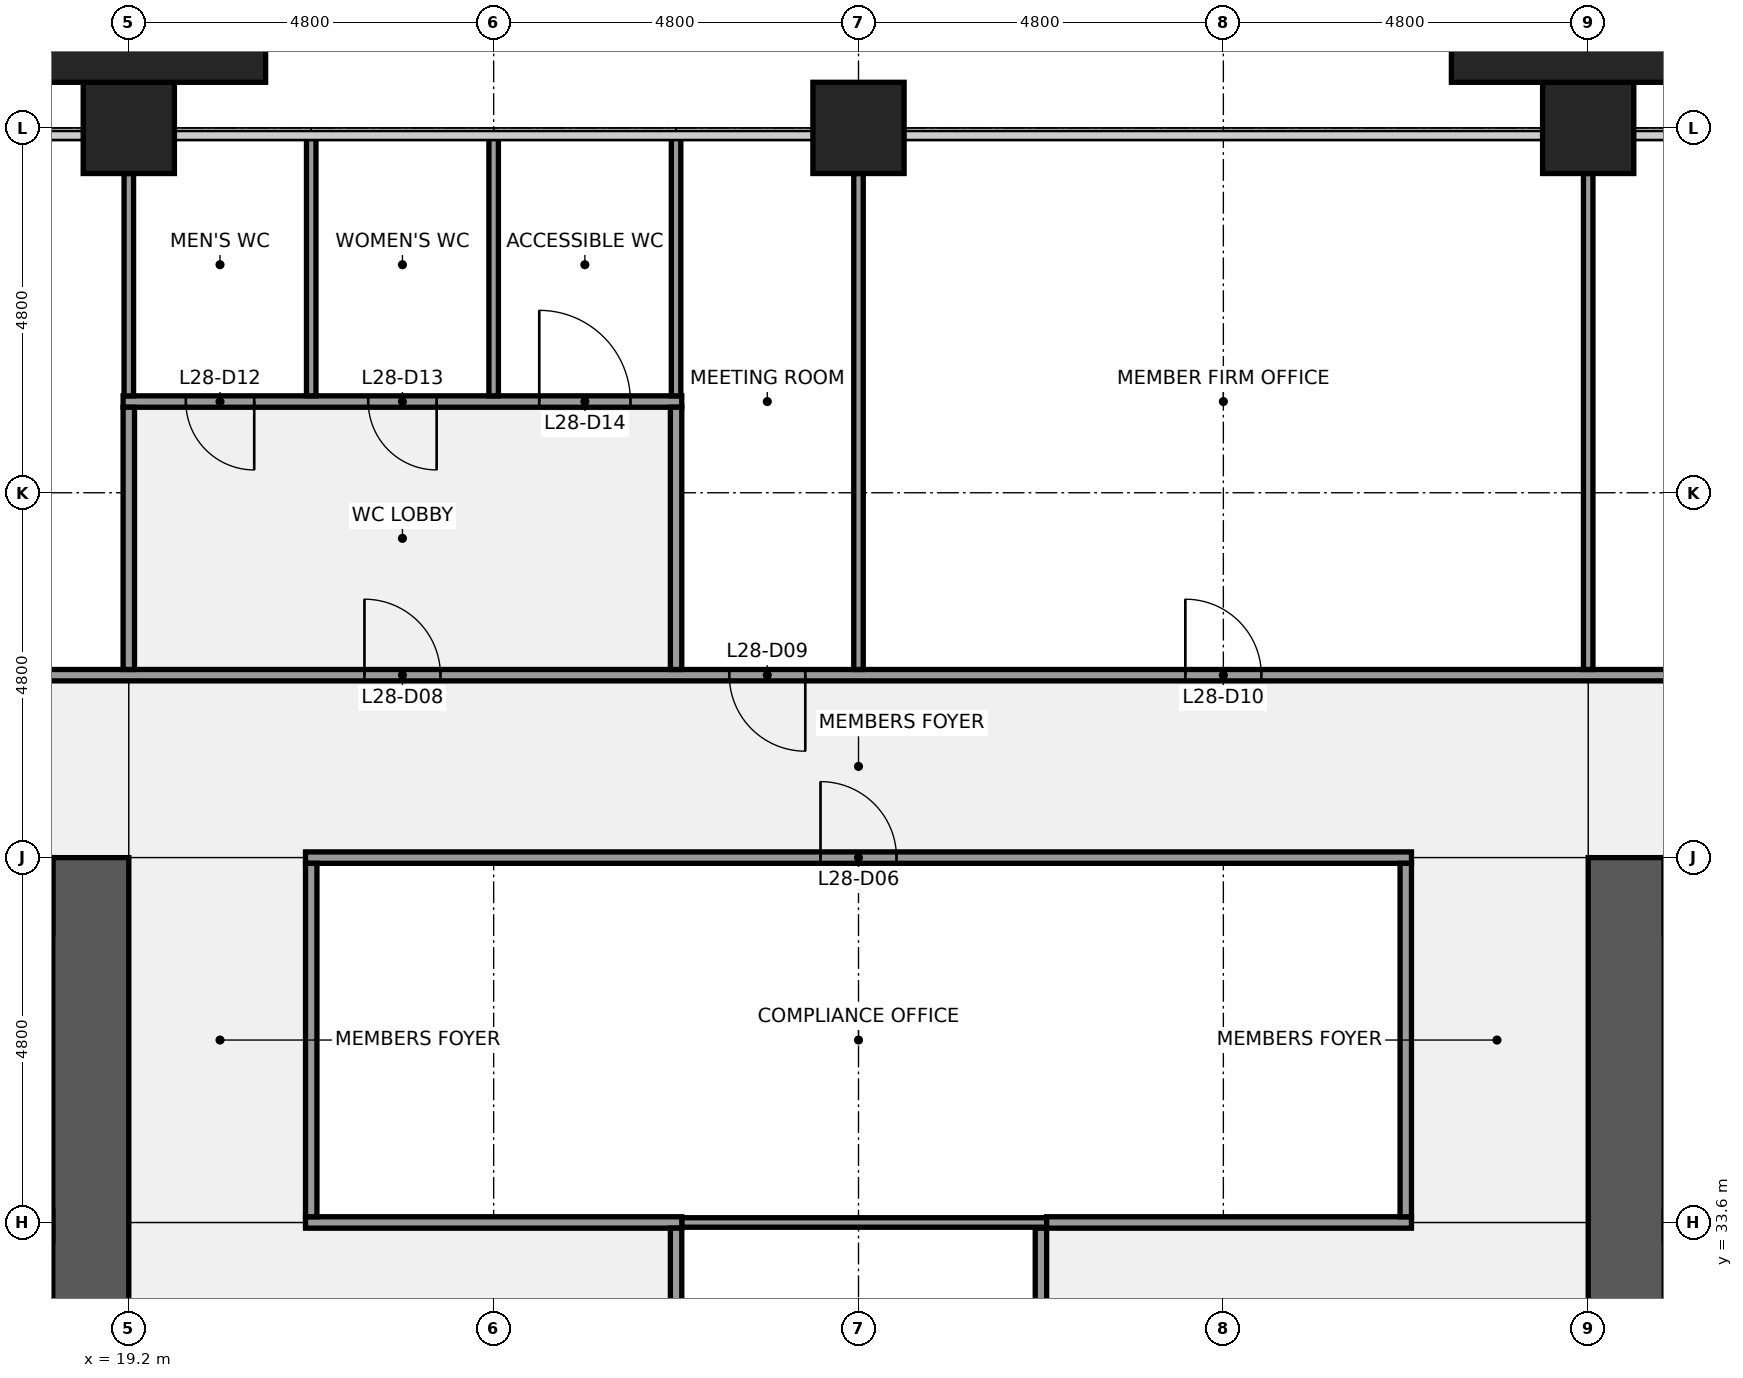
"""IFC4 building model, lengths in metres.
Left out: names, types, materials, properties, quantities, classifications, styles, units other than length and angle.
Written with IfcOpenShell. Run it as: python <this file> out.ifc"""

import sys

from ifc_helpers import new_model, si_unit, direction, frame, frame_2d, origin, origin_2d, place, context, subcontext, project, spatial, rectangle, extrude, element, fill, save


model = new_model("IFC4")
c1 = context("Model", 3, precision=1e-05, world=origin(), true_north=direction((0.0, 1.0)))
c2 = subcontext(c1, "Body", "Model", "MODEL_VIEW")
j1 = project(units=[si_unit("LENGTHUNIT", "METRE"), si_unit("PLANEANGLEUNIT", "RADIAN")], contexts=[c1])
p1 = place(None, origin())
s1 = spatial("IfcSite", under=j1, at=p1, CompositionType="ELEMENT")
p2 = place(p1, origin())
s2 = spatial("IfcBuilding", under=s1, at=p2, CompositionType="ELEMENT")
p3 = place(p2, frame((0.0, 0.0, 132.1)))
s3 = spatial("IfcBuildingStorey", under=s2, at=p3, CompositionType="ELEMENT", Elevation=132.1)
for number, where, z_axis, x_axis in (
    (1, (19.2, 48.0, 0.0), (0.0, 0.0, 1.0), (1.0, 0.0, 0.0)),
    (2, (28.8, 48.0, 0.0), (0.0, 0.0, 1.0), (1.0, 0.0, 0.0)),
    (3, (38.4, 48.0, 0.0), (0.0, 0.0, 1.0), (1.0, 0.0, 0.0)),
):
    element("IfcColumn", number, at=place(p3, frame(where, z_axis=z_axis, x_axis=x_axis)), inside=s3, PredefinedType="COLUMN", context=c2, shape_type="SweptSolid", body=[
        extrude(rectangle(XDim=1.2, YDim=1.2, at=origin_2d()), origin(), (0.0, 0.0, 1.0), 4.0),
    ])
p4 = place(p3, frame((18.7, 38.4, 0.0), z_axis=(0.0, 0.0, 1.0), x_axis=(0.0, -1.0, 0.0)))
e4 = element("IfcWall", 4, at=p4, inside=s3, PredefinedType="SHEAR", context=c2, shape_type="SweptSolid", body=[
    extrude(rectangle(XDim=28.8, YDim=1.0, at=frame_2d((14.4, 0.0))), origin(), (0.0, 0.0, 1.0), 3.84),
])
p5 = place(p4, frame((18.3, 0.0, 0.0)))
e5 = element("IfcOpeningElement", 5, at=p5, cuts=e4, PredefinedType="OPENING", context=c2, shape_type="SweptSolid", body=[
    extrude(rectangle(XDim=1.8, YDim=2.1, at=frame_2d((0.9, 1.05))), frame((0.0, 0.51, 0.0), z_axis=(0.0, -1.0, 0.0), x_axis=(1.0, 0.0, 0.0)), (0.0, 0.0, 1.0), 1.02),
])
p6 = place(p4, frame((8.7, 0.0, 0.0)))
e6 = element("IfcOpeningElement", 6, at=p6, cuts=e4, PredefinedType="OPENING", context=c2, shape_type="SweptSolid", body=[
    extrude(rectangle(XDim=1.8, YDim=2.1, at=frame_2d((0.9, 1.05))), frame((0.0, 0.51, 0.0), z_axis=(0.0, -1.0, 0.0), x_axis=(1.0, 0.0, 0.0)), (0.0, 0.0, 1.0), 1.02),
])
p7 = place(p3, frame((1.0, 33.55, 0.0), z_axis=(0.0, 0.0, 1.0), x_axis=(1.0, 0.0, 0.0)))
e7 = element("IfcWall", 7, at=p7, inside=s3, PredefinedType="SHEAR", context=c2, shape_type="SweptSolid", body=[
    extrude(rectangle(XDim=17.2, YDim=0.4, at=frame_2d((8.6, 0.0))), origin(), (0.0, 0.0, 1.0), 3.84),
])
p8 = place(p3, frame((38.9, 9.6, 0.0), z_axis=(0.0, 0.0, 1.0), x_axis=(0.0, 1.0, 0.0)))
e8 = element("IfcWall", 8, at=p8, inside=s3, PredefinedType="SHEAR", context=c2, shape_type="SweptSolid", body=[
    extrude(rectangle(XDim=28.8, YDim=1.0, at=frame_2d((14.4, 0.0))), origin(), (0.0, 0.0, 1.0), 3.84),
])
p9 = place(p8, frame((8.7, 0.0, 0.0)))
e9 = element("IfcOpeningElement", 9, at=p9, cuts=e8, PredefinedType="OPENING", context=c2, shape_type="SweptSolid", body=[
    extrude(rectangle(XDim=1.8, YDim=2.1, at=frame_2d((0.9, 1.05))), frame((0.0, 0.51, 0.0), z_axis=(0.0, -1.0, 0.0), x_axis=(1.0, 0.0, 0.0)), (0.0, 0.0, 1.0), 1.02),
])
p10 = place(p8, frame((18.3, 0.0, 0.0)))
e10 = element("IfcOpeningElement", 10, at=p10, cuts=e8, PredefinedType="OPENING", context=c2, shape_type="SweptSolid", body=[
    extrude(rectangle(XDim=1.8, YDim=2.1, at=frame_2d((0.9, 1.05))), frame((0.0, 0.51, 0.0), z_axis=(0.0, -1.0, 0.0), x_axis=(1.0, 0.0, 0.0)), (0.0, 0.0, 1.0), 1.02),
])
p11 = place(p3, frame((26.475, 33.6, 0.0), z_axis=(0.0, 0.0, 1.0), x_axis=(1.0, 0.0, 0.0)))
e11 = element("IfcWall", 11, at=p11, inside=s3, PredefinedType="PARTITIONING", context=c2, shape_type="SweptSolid", body=[
    extrude(rectangle(XDim=4.8, YDim=0.125, at=frame_2d((2.4, 0.0))), origin(), (0.0, 0.0, 1.0), 2.936),
])
p12 = place(p3, frame((21.525, 33.6, 0.0), z_axis=(0.0, 0.0, 1.0), x_axis=(1.0, 0.0, 0.0)))
e12 = element("IfcWall", 12, at=p12, inside=s3, PredefinedType="PARTITIONING", context=c2, shape_type="SweptSolid", body=[
    extrude(rectangle(XDim=4.95, YDim=0.15, at=frame_2d((2.475, 0.0))), origin(), (0.0, 0.0, 1.0), 2.936),
])
p13 = place(p3, frame((31.275, 33.6, 0.0), z_axis=(0.0, 0.0, 1.0), x_axis=(1.0, 0.0, 0.0)))
e13 = element("IfcWall", 13, at=p13, inside=s3, PredefinedType="PARTITIONING", context=c2, shape_type="SweptSolid", body=[
    extrude(rectangle(XDim=4.8, YDim=0.15, at=frame_2d((2.4, 0.0))), origin(), (0.0, 0.0, 1.0), 2.936),
])
p14 = place(p3, frame((21.525, 38.4, 0.0), z_axis=(0.0, 0.0, 1.0), x_axis=(1.0, 0.0, 0.0)))
e14 = element("IfcWall", 14, at=p14, inside=s3, PredefinedType="PARTITIONING", context=c2, shape_type="SweptSolid", body=[
    extrude(rectangle(XDim=14.55, YDim=0.15, at=frame_2d((7.275, 0.0))), origin(), (0.0, 0.0, 1.0), 2.936),
])
p15 = place(p14, frame((6.775, 0.0, 0.0)))
e15 = element("IfcOpeningElement", 15, at=p15, cuts=e14, PredefinedType="OPENING", context=c2, shape_type="SweptSolid", body=[
    extrude(rectangle(XDim=1.0, YDim=2.1, at=frame_2d((0.5, 1.05))), frame((0.0, 0.085, 0.0), z_axis=(0.0, -1.0, 0.0), x_axis=(1.0, 0.0, 0.0)), (0.0, 0.0, 1.0), 0.17),
])
p16 = place(p3, frame((14.325, 40.8, 0.0), z_axis=(0.0, 0.0, 1.0), x_axis=(1.0, 0.0, 0.0)))
e16 = element("IfcWall", 16, at=p16, inside=s3, PredefinedType="PARTITIONING", context=c2, shape_type="SweptSolid", body=[
    extrude(rectangle(XDim=28.95, YDim=0.15, at=frame_2d((14.475, 0.0))), origin(), (0.0, 0.0, 1.0), 2.936),
])
p17 = place(p16, frame((1.975, 0.0, 0.0)))
e17 = element("IfcOpeningElement", 17, at=p17, cuts=e16, PredefinedType="OPENING", context=c2, shape_type="SweptSolid", body=[
    extrude(rectangle(XDim=1.0, YDim=2.1, at=frame_2d((0.5, 1.05))), frame((0.0, 0.085, 0.0), z_axis=(0.0, -1.0, 0.0), x_axis=(1.0, 0.0, 0.0)), (0.0, 0.0, 1.0), 0.17),
])
p18 = place(p16, frame((7.975, 0.0, 0.0)))
e18 = element("IfcOpeningElement", 18, at=p18, cuts=e16, PredefinedType="OPENING", context=c2, shape_type="SweptSolid", body=[
    extrude(rectangle(XDim=1.0, YDim=2.1, at=frame_2d((0.5, 1.05))), frame((0.0, 0.085, 0.0), z_axis=(0.0, -1.0, 0.0), x_axis=(1.0, 0.0, 0.0)), (0.0, 0.0, 1.0), 0.17),
])
p19 = place(p16, frame((12.775, 0.0, 0.0)))
e19 = element("IfcOpeningElement", 19, at=p19, cuts=e16, PredefinedType="OPENING", context=c2, shape_type="SweptSolid", body=[
    extrude(rectangle(XDim=1.0, YDim=2.1, at=frame_2d((0.5, 1.05))), frame((0.0, 0.085, 0.0), z_axis=(0.0, -1.0, 0.0), x_axis=(1.0, 0.0, 0.0)), (0.0, 0.0, 1.0), 0.17),
])
p20 = place(p16, frame((18.775, 0.0, 0.0)))
e20 = element("IfcOpeningElement", 20, at=p20, cuts=e16, PredefinedType="OPENING", context=c2, shape_type="SweptSolid", body=[
    extrude(rectangle(XDim=1.0, YDim=2.1, at=frame_2d((0.5, 1.05))), frame((0.0, 0.085, 0.0), z_axis=(0.0, -1.0, 0.0), x_axis=(1.0, 0.0, 0.0)), (0.0, 0.0, 1.0), 0.17),
])
p21 = place(p16, frame((25.975, 0.0, 0.0)))
e21 = element("IfcOpeningElement", 21, at=p21, cuts=e16, PredefinedType="OPENING", context=c2, shape_type="SweptSolid", body=[
    extrude(rectangle(XDim=1.0, YDim=2.1, at=frame_2d((0.5, 1.05))), frame((0.0, 0.085, 0.0), z_axis=(0.0, -1.0, 0.0), x_axis=(1.0, 0.0, 0.0)), (0.0, 0.0, 1.0), 0.17),
])
p22 = place(p3, frame((19.125, 44.4, 0.0), z_axis=(0.0, 0.0, 1.0), x_axis=(1.0, 0.0, 0.0)))
e22 = element("IfcWall", 22, at=p22, inside=s3, PredefinedType="PARTITIONING", context=c2, shape_type="SweptSolid", body=[
    extrude(rectangle(XDim=7.35, YDim=0.15, at=frame_2d((3.675, 0.0))), origin(), (0.0, 0.0, 1.0), 2.936),
])
p23 = place(p22, frame((0.825, 0.0, 0.0)))
e23 = element("IfcOpeningElement", 23, at=p23, cuts=e22, PredefinedType="OPENING", context=c2, shape_type="SweptSolid", body=[
    extrude(rectangle(XDim=0.9, YDim=2.1, at=frame_2d((0.45, 1.05))), frame((0.0, 0.085, 0.0), z_axis=(0.0, -1.0, 0.0), x_axis=(1.0, 0.0, 0.0)), (0.0, 0.0, 1.0), 0.17),
])
p24 = place(p22, frame((3.225, 0.0, 0.0)))
e24 = element("IfcOpeningElement", 24, at=p24, cuts=e22, PredefinedType="OPENING", context=c2, shape_type="SweptSolid", body=[
    extrude(rectangle(XDim=0.9, YDim=2.1, at=frame_2d((0.45, 1.05))), frame((0.0, 0.085, 0.0), z_axis=(0.0, -1.0, 0.0), x_axis=(1.0, 0.0, 0.0)), (0.0, 0.0, 1.0), 0.17),
])
p25 = place(p22, frame((5.475, 0.0, 0.0)))
e25 = element("IfcOpeningElement", 25, at=p25, cuts=e22, PredefinedType="OPENING", context=c2, shape_type="SweptSolid", body=[
    extrude(rectangle(XDim=1.2, YDim=2.1, at=frame_2d((0.6, 1.05))), frame((0.0, 0.085, 0.0), z_axis=(0.0, -1.0, 0.0), x_axis=(1.0, 0.0, 0.0)), (0.0, 0.0, 1.0), 0.17),
])
p26 = place(p3, frame((19.2, 44.475, 0.0), z_axis=(0.0, 0.0, 1.0), x_axis=(0.0, 1.0, 0.0)))
e26 = element("IfcWall", 26, at=p26, inside=s3, PredefinedType="PARTITIONING", context=c2, shape_type="SweptSolid", body=[
    extrude(rectangle(XDim=2.925, YDim=0.125, at=frame_2d((1.462, 0.0))), origin(), (0.0, 0.0, 1.0), 2.936),
])
p27 = place(p3, frame((19.2, 40.875, 0.0), z_axis=(0.0, 0.0, 1.0), x_axis=(0.0, 1.0, 0.0)))
e27 = element("IfcWall", 27, at=p27, inside=s3, PredefinedType="PARTITIONING", context=c2, shape_type="SweptSolid", body=[
    extrude(rectangle(XDim=3.45, YDim=0.15, at=frame_2d((1.725, 0.0))), origin(), (0.0, 0.0, 1.0), 2.936),
])
p28 = place(p3, frame((21.6, 44.475, 0.0), z_axis=(0.0, 0.0, 1.0), x_axis=(0.0, 1.0, 0.0)))
e28 = element("IfcWall", 28, at=p28, inside=s3, PredefinedType="PARTITIONING", context=c2, shape_type="SweptSolid", body=[
    extrude(rectangle(XDim=3.425, YDim=0.125, at=frame_2d((1.712, 0.0))), origin(), (0.0, 0.0, 1.0), 2.936),
])
p29 = place(p3, frame((21.6, 33.675, 0.0), z_axis=(0.0, 0.0, 1.0), x_axis=(0.0, 1.0, 0.0)))
e29 = element("IfcWall", 29, at=p29, inside=s3, PredefinedType="PARTITIONING", context=c2, shape_type="SweptSolid", body=[
    extrude(rectangle(XDim=4.65, YDim=0.15, at=frame_2d((2.325, 0.0))), origin(), (0.0, 0.0, 1.0), 2.936),
])
for number, where, z_axis, x_axis in (
    (30, (24.0, 44.475, 0.0), (0.0, 0.0, 1.0), (0.0, 1.0, 0.0)),
    (31, (26.4, 44.475, 0.0), (0.0, 0.0, 1.0), (0.0, 1.0, 0.0)),
):
    element("IfcWall", number, at=place(p3, frame(where, z_axis=z_axis, x_axis=x_axis)), inside=s3, PredefinedType="PARTITIONING", context=c2, shape_type="SweptSolid", body=[
        extrude(rectangle(XDim=3.425, YDim=0.125, at=frame_2d((1.712, 0.0))), origin(), (0.0, 0.0, 1.0), 2.936),
    ])
p30 = place(p3, frame((26.4, 27.675, 0.0), z_axis=(0.0, 0.0, 1.0), x_axis=(0.0, 1.0, 0.0)))
e32 = element("IfcWall", 32, at=p30, inside=s3, PredefinedType="PARTITIONING", context=c2, shape_type="SweptSolid", body=[
    extrude(rectangle(XDim=5.85, YDim=0.15, at=frame_2d((2.925, 0.0))), origin(), (0.0, 0.0, 1.0), 2.936),
])
p31 = place(p30, frame((2.425, 0.0, 0.0)))
e33 = element("IfcOpeningElement", 33, at=p31, cuts=e32, PredefinedType="OPENING", context=c2, shape_type="SweptSolid", body=[
    extrude(rectangle(XDim=1.0, YDim=2.1, at=frame_2d((0.5, 1.05))), frame((0.0, 0.085, 0.0), z_axis=(0.0, -1.0, 0.0), x_axis=(1.0, 0.0, 0.0)), (0.0, 0.0, 1.0), 0.17),
])
p32 = place(p3, frame((26.4, 40.875, 0.0), z_axis=(0.0, 0.0, 1.0), x_axis=(0.0, 1.0, 0.0)))
e34 = element("IfcWall", 34, at=p32, inside=s3, PredefinedType="PARTITIONING", context=c2, shape_type="SweptSolid", body=[
    extrude(rectangle(XDim=3.45, YDim=0.15, at=frame_2d((1.725, 0.0))), origin(), (0.0, 0.0, 1.0), 2.936),
])
p33 = place(p3, frame((28.8, 40.875, 0.0), z_axis=(0.0, 0.0, 1.0), x_axis=(0.0, 1.0, 0.0)))
e35 = element("IfcWall", 35, at=p33, inside=s3, PredefinedType="PARTITIONING", context=c2, shape_type="SweptSolid", body=[
    extrude(rectangle(XDim=6.525, YDim=0.125, at=frame_2d((3.262, 0.0))), origin(), (0.0, 0.0, 1.0), 2.936),
])
p34 = place(p3, frame((31.2, 27.675, 0.0), z_axis=(0.0, 0.0, 1.0), x_axis=(0.0, 1.0, 0.0)))
e36 = element("IfcWall", 36, at=p34, inside=s3, PredefinedType="PARTITIONING", context=c2, shape_type="SweptSolid", body=[
    extrude(rectangle(XDim=5.85, YDim=0.15, at=frame_2d((2.925, 0.0))), origin(), (0.0, 0.0, 1.0), 2.936),
])
p35 = place(p3, frame((36.0, 33.675, 0.0), z_axis=(0.0, 0.0, 1.0), x_axis=(0.0, 1.0, 0.0)))
e37 = element("IfcWall", 37, at=p35, inside=s3, PredefinedType="PARTITIONING", context=c2, shape_type="SweptSolid", body=[
    extrude(rectangle(XDim=4.65, YDim=0.15, at=frame_2d((2.325, 0.0))), origin(), (0.0, 0.0, 1.0), 2.936),
])
p36 = place(p3, frame((38.4, 40.875, 0.0), z_axis=(0.0, 0.0, 1.0), x_axis=(0.0, 1.0, 0.0)))
e38 = element("IfcWall", 38, at=p36, inside=s3, PredefinedType="PARTITIONING", context=c2, shape_type="SweptSolid", body=[
    extrude(rectangle(XDim=6.525, YDim=0.125, at=frame_2d((3.262, 0.0))), origin(), (0.0, 0.0, 1.0), 2.936),
])
for number, where, z_axis, x_axis in (
    (39, (19.2, 49.05, 0.0), (0.0, 0.0, 1.0), (1.0, 0.0, 0.0)),
    (40, (38.4, 49.05, 0.0), (0.0, 0.0, 1.0), (1.0, 0.0, 0.0)),
):
    element("IfcColumn", number, at=place(p3, frame(where, z_axis=z_axis, x_axis=x_axis)), inside=s3, PredefinedType="PILASTER", context=c2, shape_type="SweptSolid", body=[
        extrude(rectangle(XDim=3.6, YDim=0.9, at=origin_2d()), origin(), (0.0, 0.0, 1.0), 4.0),
    ])
p37 = place(p15, origin())
e41 = element("IfcDoor", 41, at=p37, inside=s3, OperationType="SINGLE_SWING_LEFT", PredefinedType="DOOR", context=c2, shape_type="SweptSolid", body=[
    extrude(rectangle(XDim=1.0, YDim=2.1, at=frame_2d((0.5, 1.05))), frame((0.0, 0.025, 0.0), z_axis=(0.0, -1.0, 0.0), x_axis=(1.0, 0.0, 0.0)), (0.0, 0.0, 1.0), 0.05),
])
fill(e15, e41)
p38 = place(p18, origin())
e42 = element("IfcDoor", 42, at=p38, inside=s3, OperationType="SINGLE_SWING_LEFT", PredefinedType="DOOR", context=c2, shape_type="SweptSolid", body=[
    extrude(rectangle(XDim=1.0, YDim=2.1, at=frame_2d((0.5, 1.05))), frame((0.0, 0.025, 0.0), z_axis=(0.0, -1.0, 0.0), x_axis=(1.0, 0.0, 0.0)), (0.0, 0.0, 1.0), 0.05),
])
fill(e18, e42)
p39 = place(p19, origin())
e43 = element("IfcDoor", 43, at=p39, inside=s3, OperationType="SINGLE_SWING_RIGHT", PredefinedType="DOOR", context=c2, shape_type="SweptSolid", body=[
    extrude(rectangle(XDim=1.0, YDim=2.1, at=frame_2d((0.5, 1.05))), frame((0.0, 0.025, 0.0), z_axis=(0.0, -1.0, 0.0), x_axis=(1.0, 0.0, 0.0)), (0.0, 0.0, 1.0), 0.05),
])
fill(e19, e43)
p40 = place(p20, origin())
e44 = element("IfcDoor", 44, at=p40, inside=s3, OperationType="SINGLE_SWING_LEFT", PredefinedType="DOOR", context=c2, shape_type="SweptSolid", body=[
    extrude(rectangle(XDim=1.0, YDim=2.1, at=frame_2d((0.5, 1.05))), frame((0.0, 0.025, 0.0), z_axis=(0.0, -1.0, 0.0), x_axis=(1.0, 0.0, 0.0)), (0.0, 0.0, 1.0), 0.05),
])
fill(e20, e44)
p41 = place(p23, origin())
e45 = element("IfcDoor", 45, at=p41, inside=s3, OperationType="SINGLE_SWING_RIGHT", PredefinedType="DOOR", context=c2, shape_type="SweptSolid", body=[
    extrude(rectangle(XDim=0.9, YDim=2.1, at=frame_2d((0.45, 1.05))), frame((0.0, 0.025, 0.0), z_axis=(0.0, -1.0, 0.0), x_axis=(1.0, 0.0, 0.0)), (0.0, 0.0, 1.0), 0.05),
])
fill(e23, e45)
p42 = place(p24, origin())
e46 = element("IfcDoor", 46, at=p42, inside=s3, OperationType="SINGLE_SWING_RIGHT", PredefinedType="DOOR", context=c2, shape_type="SweptSolid", body=[
    extrude(rectangle(XDim=0.9, YDim=2.1, at=frame_2d((0.45, 1.05))), frame((0.0, 0.025, 0.0), z_axis=(0.0, -1.0, 0.0), x_axis=(1.0, 0.0, 0.0)), (0.0, 0.0, 1.0), 0.05),
])
fill(e24, e46)
p43 = place(p25, origin())
e47 = element("IfcDoor", 47, at=p43, inside=s3, OperationType="SINGLE_SWING_LEFT", PredefinedType="DOOR", context=c2, shape_type="SweptSolid", body=[
    extrude(rectangle(XDim=1.2, YDim=2.1, at=frame_2d((0.6, 1.05))), frame((0.0, 0.025, 0.0), z_axis=(0.0, -1.0, 0.0), x_axis=(1.0, 0.0, 0.0)), (0.0, 0.0, 1.0), 0.05),
])
fill(e25, e47)
save(model, sys.argv[1])
